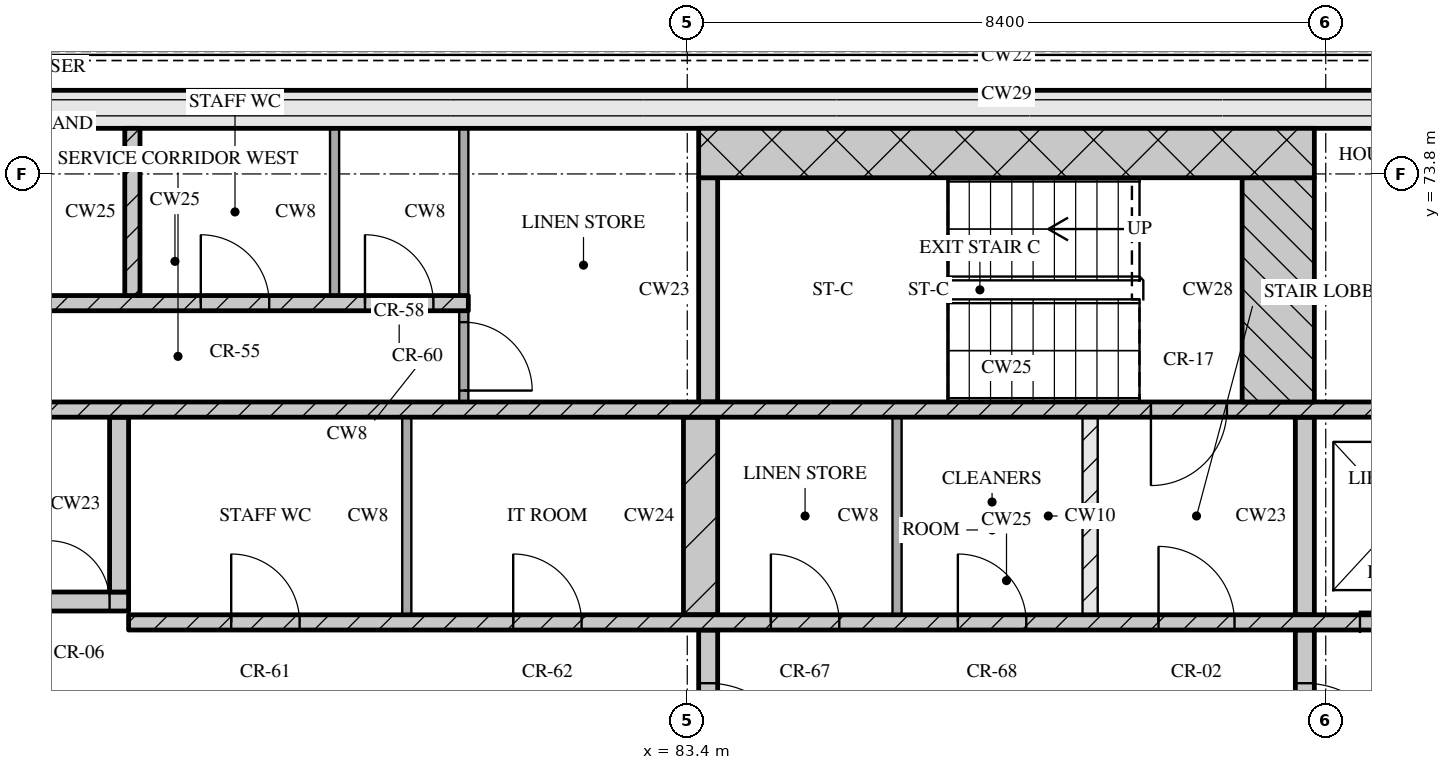
"""IFC4 building model, lengths in metres.
Left out: names, types, materials, properties, quantities, classifications, styles, units other than length and angle.
Written with IfcOpenShell. Run it as: python <this file> out.ifc"""

import sys

from ifc_helpers import new_model, si_unit, direction, frame, frame_2d, origin, place, context, subcontext, project, spatial, rectangle, extrude, element, fill, save


model = new_model("IFC4")
c1 = context("Model", 3, precision=1e-05, world=origin(), true_north=direction((0.0, 1.0)))
c2 = subcontext(c1, "Body", "Model", "MODEL_VIEW")
j1 = project(units=[si_unit("LENGTHUNIT", "METRE"), si_unit("PLANEANGLEUNIT", "RADIAN")], contexts=[c1])
p1 = place(None, origin())
s1 = spatial("IfcSite", under=j1, at=p1, CompositionType="ELEMENT")
p2 = place(p1, origin())
s2 = spatial("IfcBuilding", under=s1, at=p2, CompositionType="ELEMENT")
p3 = place(p2, frame((0.0, 0.0, 277.95)))
s3 = spatial("IfcBuildingStorey", under=s2, at=p3, CompositionType="ELEMENT", Elevation=277.95)
p4 = place(p3, frame((67.3, 74.65, 0.0), z_axis=(0.0, 0.0, 1.0), x_axis=(1.0, 0.0, 0.0)))
e1 = element("IfcWall", 1, at=p4, inside=s3, PredefinedType="SOLIDWALL", context=c2, shape_type="SweptSolid", body=[
    extrude(rectangle(XDim=40.6, YDim=0.5, at=frame_2d((20.3, 0.0))), origin(), (0.0, 0.0, 1.0), 3.32),
])
p5 = place(p3, frame((83.675, 65.2, 0.0), z_axis=(0.0, 0.0, 1.0), x_axis=(0.0, 1.0, 0.0)))
e2 = element("IfcWall", 2, at=p5, inside=s3, PredefinedType="SOLIDWALL", context=c2, shape_type="SweptSolid", body=[
    extrude(rectangle(XDim=2.6, YDim=0.25, at=frame_2d((1.3, 0.0))), origin(), (0.0, 0.0, 1.0), 3.32),
])
p6 = place(p5, frame((0.7, 0.0, 0.0)))
e3 = element("IfcOpeningElement", 3, at=p6, cuts=e2, PredefinedType="OPENING", context=c2, shape_type="SweptSolid", body=[
    extrude(rectangle(XDim=1.2, YDim=2.1, at=frame_2d((0.6, 1.05))), frame((0.0, 0.135, 0.0), z_axis=(0.0, -1.0, 0.0), x_axis=(1.0, 0.0, 0.0)), (0.0, 0.0, 1.0), 0.27),
])
p7 = place(p3, frame((91.525, 65.2, 0.0), z_axis=(0.0, 0.0, 1.0), x_axis=(0.0, 1.0, 0.0)))
e4 = element("IfcWall", 4, at=p7, inside=s3, PredefinedType="SOLIDWALL", context=c2, shape_type="SweptSolid", body=[
    extrude(rectangle(XDim=2.6, YDim=0.25, at=frame_2d((1.3, 0.0))), origin(), (0.0, 0.0, 1.0), 3.32),
])
p8 = place(p7, frame((0.7, 0.0, 0.0)))
e5 = element("IfcOpeningElement", 5, at=p8, cuts=e4, PredefinedType="OPENING", context=c2, shape_type="SweptSolid", body=[
    extrude(rectangle(XDim=1.2, YDim=2.1, at=frame_2d((0.6, 1.05))), frame((0.0, 0.135, 0.0), z_axis=(0.0, -1.0, 0.0), x_axis=(1.0, 0.0, 0.0)), (0.0, 0.0, 1.0), 0.27),
])
p9 = place(p3, frame((76.05, 67.9, 0.0), z_axis=(0.0, 0.0, 1.0), x_axis=(1.0, 0.0, 0.0)))
e6 = element("IfcWall", 6, at=p9, inside=s3, PredefinedType="SOLIDWALL", context=c2, shape_type="SweptSolid", body=[
    extrude(rectangle(XDim=23.1, YDim=0.2, at=frame_2d((11.55, 0.0))), origin(), (0.0, 0.0, 1.0), 3.32),
])
p10 = place(p9, frame((1.35, 0.0, 0.0)))
e7 = element("IfcOpeningElement", 7, at=p10, cuts=e6, PredefinedType="OPENING", context=c2, shape_type="SweptSolid", body=[
    extrude(rectangle(XDim=0.9, YDim=2.1, at=frame_2d((0.45, 1.05))), frame((0.0, 0.11, 0.0), z_axis=(0.0, -1.0, 0.0), x_axis=(1.0, 0.0, 0.0)), (0.0, 0.0, 1.0), 0.22),
])
p11 = place(p9, frame((5.06, 0.0, 0.0)))
e8 = element("IfcOpeningElement", 8, at=p11, cuts=e6, PredefinedType="OPENING", context=c2, shape_type="SweptSolid", body=[
    extrude(rectangle(XDim=0.9, YDim=2.1, at=frame_2d((0.45, 1.05))), frame((0.0, 0.11, 0.0), z_axis=(0.0, -1.0, 0.0), x_axis=(1.0, 0.0, 0.0)), (0.0, 0.0, 1.0), 0.22),
])
p12 = place(p9, frame((8.45, 0.0, 0.0)))
e9 = element("IfcOpeningElement", 9, at=p12, cuts=e6, PredefinedType="OPENING", context=c2, shape_type="SweptSolid", body=[
    extrude(rectangle(XDim=0.9, YDim=2.1, at=frame_2d((0.45, 1.05))), frame((0.0, 0.11, 0.0), z_axis=(0.0, -1.0, 0.0), x_axis=(1.0, 0.0, 0.0)), (0.0, 0.0, 1.0), 0.22),
])
p13 = place(p9, frame((10.91, 0.0, 0.0)))
e10 = element("IfcOpeningElement", 10, at=p13, cuts=e6, PredefinedType="OPENING", context=c2, shape_type="SweptSolid", body=[
    extrude(rectangle(XDim=0.9, YDim=2.1, at=frame_2d((0.45, 1.05))), frame((0.0, 0.11, 0.0), z_axis=(0.0, -1.0, 0.0), x_axis=(1.0, 0.0, 0.0)), (0.0, 0.0, 1.0), 0.22),
])
p14 = place(p9, frame((13.55, 0.0, 0.0)))
e11 = element("IfcOpeningElement", 11, at=p14, cuts=e6, PredefinedType="OPENING", context=c2, shape_type="SweptSolid", body=[
    extrude(rectangle(XDim=1.0, YDim=2.1, at=frame_2d((0.5, 1.05))), frame((0.0, 0.11, 0.0), z_axis=(0.0, -1.0, 0.0), x_axis=(1.0, 0.0, 0.0)), (0.0, 0.0, 1.0), 0.22),
])
p15 = place(p9, frame((16.2, 0.0, 0.0)))
e12 = element("IfcOpeningElement", 12, at=p15, cuts=e6, PredefinedType="OPENING", context=c2, shape_type="SweptSolid", body=[
    extrude(rectangle(XDim=1.1, YDim=2.1, at=frame_2d((0.55, 1.05))), frame((0.0, 0.11, 0.0), z_axis=(0.0, -1.0, 0.0), x_axis=(1.0, 0.0, 0.0)), (0.0, 0.0, 1.0), 0.22),
])
p16 = place(p9, frame((18.7, 0.0, 0.0)))
e13 = element("IfcOpeningElement", 13, at=p16, cuts=e6, PredefinedType="OPENING", context=c2, shape_type="SweptSolid", body=[
    extrude(rectangle(XDim=1.1, YDim=2.1, at=frame_2d((0.55, 1.05))), frame((0.0, 0.11, 0.0), z_axis=(0.0, -1.0, 0.0), x_axis=(1.0, 0.0, 0.0)), (0.0, 0.0, 1.0), 0.22),
])
p17 = place(p9, frame((21.2, 0.0, 0.0)))
e14 = element("IfcOpeningElement", 14, at=p17, cuts=e6, PredefinedType="OPENING", context=c2, shape_type="SweptSolid", body=[
    extrude(rectangle(XDim=1.1, YDim=2.1, at=frame_2d((0.55, 1.05))), frame((0.0, 0.11, 0.0), z_axis=(0.0, -1.0, 0.0), x_axis=(1.0, 0.0, 0.0)), (0.0, 0.0, 1.0), 0.22),
])
p18 = place(p3, frame((79.71, 68.0, 0.0), z_axis=(0.0, 0.0, 1.0), x_axis=(0.0, 1.0, 0.0)))
e15 = element("IfcWall", 15, at=p18, inside=s3, PredefinedType="PARTITIONING", context=c2, shape_type="SweptSolid", body=[
    extrude(rectangle(XDim=2.6, YDim=0.12, at=frame_2d((1.3, 0.0))), origin(), (0.0, 0.0, 1.0), 3.32),
])
p19 = place(p3, frame((83.575, 68.0, 0.0), z_axis=(0.0, 0.0, 1.0), x_axis=(0.0, 1.0, 0.0)))
e16 = element("IfcWall", 16, at=p19, inside=s3, PredefinedType="SOLIDWALL", context=c2, shape_type="SweptSolid", body=[
    extrude(rectangle(XDim=2.6, YDim=0.45, at=frame_2d((1.3, 0.0))), origin(), (0.0, 0.0, 1.0), 3.32),
])
p20 = place(p3, frame((86.16, 68.0, 0.0), z_axis=(0.0, 0.0, 1.0), x_axis=(0.0, 1.0, 0.0)))
e17 = element("IfcWall", 17, at=p20, inside=s3, PredefinedType="PARTITIONING", context=c2, shape_type="SweptSolid", body=[
    extrude(rectangle(XDim=2.6, YDim=0.12, at=frame_2d((1.3, 0.0))), origin(), (0.0, 0.0, 1.0), 3.32),
])
p21 = place(p3, frame((88.7, 68.0, 0.0), z_axis=(0.0, 0.0, 1.0), x_axis=(0.0, 1.0, 0.0)))
e18 = element("IfcWall", 18, at=p21, inside=s3, PredefinedType="PARTITIONING", context=c2, shape_type="SweptSolid", body=[
    extrude(rectangle(XDim=2.6, YDim=0.2, at=frame_2d((1.3, 0.0))), origin(), (0.0, 0.0, 1.0), 3.32),
])
p22 = place(p3, frame((91.525, 68.0, 0.0), z_axis=(0.0, 0.0, 1.0), x_axis=(0.0, 1.0, 0.0)))
e19 = element("IfcWall", 19, at=p22, inside=s3, PredefinedType="SOLIDWALL", context=c2, shape_type="SweptSolid", body=[
    extrude(rectangle(XDim=2.6, YDim=0.25, at=frame_2d((1.3, 0.0))), origin(), (0.0, 0.0, 1.0), 3.32),
])
p23 = place(p3, frame((67.8, 68.175, 0.0), z_axis=(0.0, 0.0, 1.0), x_axis=(1.0, 0.0, 0.0)))
e20 = element("IfcWall", 20, at=p23, inside=s3, PredefinedType="SOLIDWALL", context=c2, shape_type="SweptSolid", body=[
    extrude(rectangle(XDim=8.25, YDim=0.25, at=frame_2d((4.125, 0.0))), origin(), (0.0, 0.0, 1.0), 3.32),
])
p24 = place(p23, frame((5.7, 0.0, 0.0)))
e21 = element("IfcOpeningElement", 21, at=p24, cuts=e20, PredefinedType="OPENING", context=c2, shape_type="SweptSolid", body=[
    extrude(rectangle(XDim=1.0, YDim=2.1, at=frame_2d((0.5, 1.05))), frame((0.0, 0.135, 0.0), z_axis=(0.0, -1.0, 0.0), x_axis=(1.0, 0.0, 0.0)), (0.0, 0.0, 1.0), 0.27),
])
p25 = place(p23, frame((7.2, 0.0, 0.0)))
e22 = element("IfcOpeningElement", 22, at=p25, cuts=e20, PredefinedType="OPENING", context=c2, shape_type="SweptSolid", body=[
    extrude(rectangle(XDim=0.8, YDim=2.1, at=frame_2d((0.4, 1.05))), frame((0.0, 0.135, 0.0), z_axis=(0.0, -1.0, 0.0), x_axis=(1.0, 0.0, 0.0)), (0.0, 0.0, 1.0), 0.27),
])
p26 = place(p3, frame((75.925, 68.3, 0.0), z_axis=(0.0, 0.0, 1.0), x_axis=(0.0, 1.0, 0.0)))
e23 = element("IfcWall", 23, at=p26, inside=s3, PredefinedType="SOLIDWALL", context=c2, shape_type="SweptSolid", body=[
    extrude(rectangle(XDim=2.3, YDim=0.25, at=frame_2d((1.15, 0.0))), origin(), (0.0, 0.0, 1.0), 3.32),
])
p27 = place(p3, frame((67.8, 70.7, 0.0), z_axis=(0.0, 0.0, 1.0), x_axis=(1.0, 0.0, 0.0)))
e24 = element("IfcWall", 24, at=p27, inside=s3, PredefinedType="SOLIDWALL", context=c2, shape_type="SweptSolid", body=[
    extrude(rectangle(XDim=39.6, YDim=0.2, at=frame_2d((19.8, 0.0))), origin(), (0.0, 0.0, 1.0), 3.32),
])
p28 = place(p27, frame((0.65, 0.0, 0.0)))
e25 = element("IfcOpeningElement", 25, at=p28, cuts=e24, PredefinedType="OPENING", context=c2, shape_type="SweptSolid", body=[
    extrude(rectangle(XDim=1.1, YDim=2.1, at=frame_2d((0.55, 1.05))), frame((0.0, 0.11, 0.0), z_axis=(0.0, -1.0, 0.0), x_axis=(1.0, 0.0, 0.0)), (0.0, 0.0, 1.0), 0.22),
])
p29 = place(p27, frame((3.25, 0.0, 0.0)))
e26 = element("IfcOpeningElement", 26, at=p29, cuts=e24, PredefinedType="OPENING", context=c2, shape_type="SweptSolid", body=[
    extrude(rectangle(XDim=1.1, YDim=2.1, at=frame_2d((0.55, 1.05))), frame((0.0, 0.11, 0.0), z_axis=(0.0, -1.0, 0.0), x_axis=(1.0, 0.0, 0.0)), (0.0, 0.0, 1.0), 0.22),
])
p30 = place(p27, frame((5.9, 0.0, 0.0)))
e27 = element("IfcOpeningElement", 27, at=p30, cuts=e24, PredefinedType="OPENING", context=c2, shape_type="SweptSolid", body=[
    extrude(rectangle(XDim=1.0, YDim=2.1, at=frame_2d((0.5, 1.05))), frame((0.0, 0.11, 0.0), z_axis=(0.0, -1.0, 0.0), x_axis=(1.0, 0.0, 0.0)), (0.0, 0.0, 1.0), 0.22),
])
p31 = place(p27, frame((21.7, 0.0, 0.0)))
e28 = element("IfcOpeningElement", 28, at=p31, cuts=e24, PredefinedType="OPENING", context=c2, shape_type="SweptSolid", body=[
    extrude(rectangle(XDim=1.0, YDim=2.1, at=frame_2d((0.5, 1.05))), frame((0.0, 0.11, 0.0), z_axis=(0.0, -1.0, 0.0), x_axis=(1.0, 0.0, 0.0)), (0.0, 0.0, 1.0), 0.22),
])
p32 = place(p27, frame((32.7, 0.0, 0.0)))
e29 = element("IfcOpeningElement", 29, at=p32, cuts=e24, PredefinedType="OPENING", context=c2, shape_type="SweptSolid", body=[
    extrude(rectangle(XDim=1.0, YDim=2.1, at=frame_2d((0.5, 1.05))), frame((0.0, 0.11, 0.0), z_axis=(0.0, -1.0, 0.0), x_axis=(1.0, 0.0, 0.0)), (0.0, 0.0, 1.0), 0.22),
])
p33 = place(p27, frame((35.25, 0.0, 0.0)))
e30 = element("IfcOpeningElement", 30, at=p33, cuts=e24, PredefinedType="OPENING", context=c2, shape_type="SweptSolid", body=[
    extrude(rectangle(XDim=1.1, YDim=2.1, at=frame_2d((0.55, 1.05))), frame((0.0, 0.11, 0.0), z_axis=(0.0, -1.0, 0.0), x_axis=(1.0, 0.0, 0.0)), (0.0, 0.0, 1.0), 0.22),
])
p34 = place(p27, frame((37.85, 0.0, 0.0)))
e31 = element("IfcOpeningElement", 31, at=p34, cuts=e24, PredefinedType="OPENING", context=c2, shape_type="SweptSolid", body=[
    extrude(rectangle(XDim=1.1, YDim=2.1, at=frame_2d((0.55, 1.05))), frame((0.0, 0.11, 0.0), z_axis=(0.0, -1.0, 0.0), x_axis=(1.0, 0.0, 0.0)), (0.0, 0.0, 1.0), 0.22),
])
p35 = place(p3, frame((80.46, 70.8, 0.0), z_axis=(0.0, 0.0, 1.0), x_axis=(0.0, 1.0, 0.0)))
e32 = element("IfcWall", 32, at=p35, inside=s3, PredefinedType="PARTITIONING", context=c2, shape_type="SweptSolid", body=[
    extrude(rectangle(XDim=1.2, YDim=0.12, at=frame_2d((0.6, 0.0))), origin(), (0.0, 0.0, 1.0), 3.32),
])
p36 = place(p35, frame((0.15, 0.0, 0.0)))
e33 = element("IfcOpeningElement", 33, at=p36, cuts=e32, PredefinedType="OPENING", context=c2, shape_type="SweptSolid", body=[
    extrude(rectangle(XDim=0.9, YDim=2.1, at=frame_2d((0.45, 1.05))), frame((0.0, 0.07, 0.0), z_axis=(0.0, -1.0, 0.0), x_axis=(1.0, 0.0, 0.0)), (0.0, 0.0, 1.0), 0.14),
])
p37 = place(p3, frame((83.675, 70.8, 0.0), z_axis=(0.0, 0.0, 1.0), x_axis=(0.0, 1.0, 0.0)))
e34 = element("IfcWall", 34, at=p37, inside=s3, PredefinedType="SOLIDWALL", context=c2, shape_type="SweptSolid", body=[
    extrude(rectangle(XDim=2.95, YDim=0.25, at=frame_2d((1.475, 0.0))), origin(), (0.0, 0.0, 1.0), 3.32),
])
p38 = place(p3, frame((91.175, 70.8, 0.0), z_axis=(0.0, 0.0, 1.0), x_axis=(0.0, 1.0, 0.0)))
e35 = element("IfcWall", 35, at=p38, inside=s3, PredefinedType="SOLIDWALL", context=c2, shape_type="SweptSolid", body=[
    extrude(rectangle(XDim=2.95, YDim=0.95, at=frame_2d((1.475, 0.0))), origin(), (0.0, 0.0, 1.0), 3.32),
])
p39 = place(p3, frame((72.8, 72.1, 0.0), z_axis=(0.0, 0.0, 1.0), x_axis=(1.0, 0.0, 0.0)))
e36 = element("IfcWall", 36, at=p39, inside=s3, PredefinedType="SOLIDWALL", context=c2, shape_type="SweptSolid", body=[
    extrude(rectangle(XDim=7.72, YDim=0.2, at=frame_2d((3.86, 0.0))), origin(), (0.0, 0.0, 1.0), 3.32),
])
p40 = place(p39, frame((1.25, 0.0, 0.0)))
e37 = element("IfcOpeningElement", 37, at=p40, cuts=e36, PredefinedType="OPENING", context=c2, shape_type="SweptSolid", body=[
    extrude(rectangle(XDim=0.9, YDim=2.1, at=frame_2d((0.45, 1.05))), frame((0.0, 0.11, 0.0), z_axis=(0.0, -1.0, 0.0), x_axis=(1.0, 0.0, 0.0)), (0.0, 0.0, 1.0), 0.22),
])
p41 = place(p39, frame((4.2, 0.0, 0.0)))
e38 = element("IfcOpeningElement", 38, at=p41, cuts=e36, PredefinedType="OPENING", context=c2, shape_type="SweptSolid", body=[
    extrude(rectangle(XDim=0.9, YDim=2.1, at=frame_2d((0.45, 1.05))), frame((0.0, 0.11, 0.0), z_axis=(0.0, -1.0, 0.0), x_axis=(1.0, 0.0, 0.0)), (0.0, 0.0, 1.0), 0.22),
])
p42 = place(p39, frame((6.36, 0.0, 0.0)))
e39 = element("IfcOpeningElement", 39, at=p42, cuts=e36, PredefinedType="OPENING", context=c2, shape_type="SweptSolid", body=[
    extrude(rectangle(XDim=0.9, YDim=2.1, at=frame_2d((0.45, 1.05))), frame((0.0, 0.11, 0.0), z_axis=(0.0, -1.0, 0.0), x_axis=(1.0, 0.0, 0.0)), (0.0, 0.0, 1.0), 0.22),
])
p43 = place(p3, frame((76.1, 72.2, 0.0), z_axis=(0.0, 0.0, 1.0), x_axis=(0.0, 1.0, 0.0)))
e40 = element("IfcWall", 40, at=p43, inside=s3, PredefinedType="SOLIDWALL", context=c2, shape_type="SweptSolid", body=[
    extrude(rectangle(XDim=2.2, YDim=0.2, at=frame_2d((1.1, 0.0))), origin(), (0.0, 0.0, 1.0), 3.32),
])
for number, where, z_axis, x_axis in (
    (41, (78.76, 72.2, 0.0), (0.0, 0.0, 1.0), (0.0, 1.0, 0.0)),
    (42, (80.46, 72.2, 0.0), (0.0, 0.0, 1.0), (0.0, 1.0, 0.0)),
):
    element("IfcWall", number, at=place(p3, frame(where, z_axis=z_axis, x_axis=x_axis)), inside=s3, PredefinedType="PARTITIONING", context=c2, shape_type="SweptSolid", body=[
        extrude(rectangle(XDim=2.2, YDim=0.12, at=frame_2d((1.1, 0.0))), origin(), (0.0, 0.0, 1.0), 3.32),
    ])
p44 = place(p3, frame((83.55, 74.075, 0.0), z_axis=(0.0, 0.0, 1.0), x_axis=(1.0, 0.0, 0.0)))
e43 = element("IfcWall", 43, at=p44, inside=s3, PredefinedType="SOLIDWALL", context=c2, shape_type="SweptSolid", body=[
    extrude(rectangle(XDim=8.1, YDim=0.65, at=frame_2d((4.05, 0.0))), origin(), (0.0, 0.0, 1.0), 3.32),
])
p45 = place(p6, origin())
e44 = element("IfcDoor", 44, at=p45, inside=s3, OperationType="SINGLE_SWING_RIGHT", PredefinedType="DOOR", context=c2, shape_type="SweptSolid", body=[
    extrude(rectangle(XDim=1.2, YDim=2.1, at=frame_2d((0.6, 1.05))), frame((0.0, 0.025, 0.0), z_axis=(0.0, -1.0, 0.0), x_axis=(1.0, 0.0, 0.0)), (0.0, 0.0, 1.0), 0.05),
])
fill(e3, e44)
p46 = place(p8, origin())
e45 = element("IfcDoor", 45, at=p46, inside=s3, OperationType="SINGLE_SWING_RIGHT", PredefinedType="DOOR", context=c2, shape_type="SweptSolid", body=[
    extrude(rectangle(XDim=1.2, YDim=2.1, at=frame_2d((0.6, 1.05))), frame((0.0, 0.025, 0.0), z_axis=(0.0, -1.0, 0.0), x_axis=(1.0, 0.0, 0.0)), (0.0, 0.0, 1.0), 0.05),
])
fill(e5, e45)
p47 = place(p10, origin())
e46 = element("IfcDoor", 46, at=p47, inside=s3, OperationType="SINGLE_SWING_LEFT", PredefinedType="DOOR", context=c2, shape_type="SweptSolid", body=[
    extrude(rectangle(XDim=0.9, YDim=2.1, at=frame_2d((0.45, 1.05))), frame((0.0, 0.025, 0.0), z_axis=(0.0, -1.0, 0.0), x_axis=(1.0, 0.0, 0.0)), (0.0, 0.0, 1.0), 0.05),
])
fill(e7, e46)
p48 = place(p11, origin())
e47 = element("IfcDoor", 47, at=p48, inside=s3, OperationType="SINGLE_SWING_LEFT", PredefinedType="DOOR", context=c2, shape_type="SweptSolid", body=[
    extrude(rectangle(XDim=0.9, YDim=2.1, at=frame_2d((0.45, 1.05))), frame((0.0, 0.025, 0.0), z_axis=(0.0, -1.0, 0.0), x_axis=(1.0, 0.0, 0.0)), (0.0, 0.0, 1.0), 0.05),
])
fill(e8, e47)
p49 = place(p12, origin())
e48 = element("IfcDoor", 48, at=p49, inside=s3, OperationType="SINGLE_SWING_LEFT", PredefinedType="DOOR", context=c2, shape_type="SweptSolid", body=[
    extrude(rectangle(XDim=0.9, YDim=2.1, at=frame_2d((0.45, 1.05))), frame((0.0, 0.025, 0.0), z_axis=(0.0, -1.0, 0.0), x_axis=(1.0, 0.0, 0.0)), (0.0, 0.0, 1.0), 0.05),
])
fill(e9, e48)
p50 = place(p13, origin())
e49 = element("IfcDoor", 49, at=p50, inside=s3, OperationType="SINGLE_SWING_LEFT", PredefinedType="DOOR", context=c2, shape_type="SweptSolid", body=[
    extrude(rectangle(XDim=0.9, YDim=2.1, at=frame_2d((0.45, 1.05))), frame((0.0, 0.025, 0.0), z_axis=(0.0, -1.0, 0.0), x_axis=(1.0, 0.0, 0.0)), (0.0, 0.0, 1.0), 0.05),
])
fill(e10, e49)
p51 = place(p14, origin())
e50 = element("IfcDoor", 50, at=p51, inside=s3, OperationType="SINGLE_SWING_LEFT", PredefinedType="DOOR", context=c2, shape_type="SweptSolid", body=[
    extrude(rectangle(XDim=1.0, YDim=2.1, at=frame_2d((0.5, 1.05))), frame((0.0, 0.025, 0.0), z_axis=(0.0, -1.0, 0.0), x_axis=(1.0, 0.0, 0.0)), (0.0, 0.0, 1.0), 0.05),
])
fill(e11, e50)
p52 = place(p15, origin())
e51 = element("IfcDoor", 51, at=p52, inside=s3, OperationType="SLIDING_TO_RIGHT", PredefinedType="DOOR", context=c2, shape_type="SweptSolid", body=[
    extrude(rectangle(XDim=1.1, YDim=2.1, at=frame_2d((0.55, 1.05))), frame((0.0, 0.025, 0.0), z_axis=(0.0, -1.0, 0.0), x_axis=(1.0, 0.0, 0.0)), (0.0, 0.0, 1.0), 0.05),
])
fill(e12, e51)
p53 = place(p25, origin())
e52 = element("IfcDoor", 52, at=p53, inside=s3, OperationType="SINGLE_SWING_LEFT", PredefinedType="DOOR", context=c2, shape_type="SweptSolid", body=[
    extrude(rectangle(XDim=0.8, YDim=2.1, at=frame_2d((0.4, 1.05))), frame((0.0, 0.025, 0.0), z_axis=(0.0, -1.0, 0.0), x_axis=(1.0, 0.0, 0.0)), (0.0, 0.0, 1.0), 0.05),
])
fill(e22, e52)
p54 = place(p31, origin())
e53 = element("IfcDoor", 53, at=p54, inside=s3, OperationType="SINGLE_SWING_RIGHT", PredefinedType="DOOR", context=c2, shape_type="SweptSolid", body=[
    extrude(rectangle(XDim=1.0, YDim=2.1, at=frame_2d((0.5, 1.05))), frame((0.0, 0.025, 0.0), z_axis=(0.0, -1.0, 0.0), x_axis=(1.0, 0.0, 0.0)), (0.0, 0.0, 1.0), 0.05),
])
fill(e28, e53)
p55 = place(p36, origin())
e54 = element("IfcDoor", 54, at=p55, inside=s3, OperationType="SINGLE_SWING_RIGHT", PredefinedType="DOOR", context=c2, shape_type="SweptSolid", body=[
    extrude(rectangle(XDim=0.9, YDim=2.1, at=frame_2d((0.45, 1.05))), frame((0.0, 0.025, 0.0), z_axis=(0.0, -1.0, 0.0), x_axis=(1.0, 0.0, 0.0)), (0.0, 0.0, 1.0), 0.05),
])
fill(e33, e54)
p56 = place(p41, origin())
e55 = element("IfcDoor", 55, at=p56, inside=s3, OperationType="SINGLE_SWING_LEFT", PredefinedType="DOOR", context=c2, shape_type="SweptSolid", body=[
    extrude(rectangle(XDim=0.9, YDim=2.1, at=frame_2d((0.45, 1.05))), frame((0.0, 0.025, 0.0), z_axis=(0.0, -1.0, 0.0), x_axis=(1.0, 0.0, 0.0)), (0.0, 0.0, 1.0), 0.05),
])
fill(e38, e55)
p57 = place(p42, origin())
e56 = element("IfcDoor", 56, at=p57, inside=s3, OperationType="SINGLE_SWING_LEFT", PredefinedType="DOOR", context=c2, shape_type="SweptSolid", body=[
    extrude(rectangle(XDim=0.9, YDim=2.1, at=frame_2d((0.45, 1.05))), frame((0.0, 0.025, 0.0), z_axis=(0.0, -1.0, 0.0), x_axis=(1.0, 0.0, 0.0)), (0.0, 0.0, 1.0), 0.05),
])
fill(e39, e56)
save(model, sys.argv[1])
